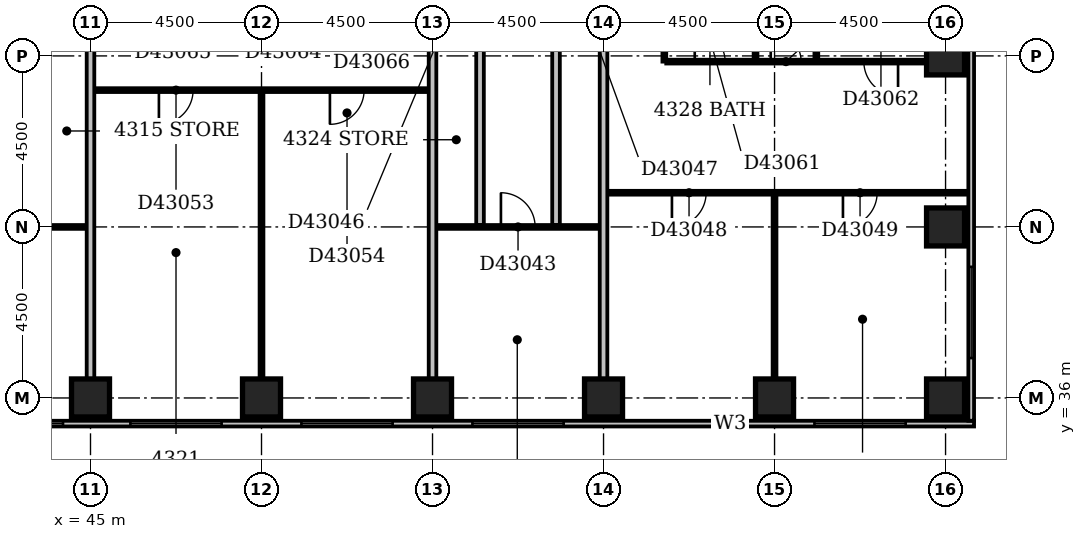
"""IFC4 building model, lengths in metres.
Left out: names, types, materials, properties, quantities, classifications, styles, units other than length and angle.
Written with IfcOpenShell. Run it as: python <this file> out.ifc"""

import sys

from ifc_helpers import new_model, si_unit, direction, frame, frame_2d, origin, origin_2d, place, context, subcontext, project, spatial, rectangle, extrude, element, fill, save


model = new_model("IFC4")
c1 = context("Model", 3, precision=1e-05, world=origin(), true_north=direction((0.0, 1.0)))
c2 = subcontext(c1, "Body", "Model", "MODEL_VIEW")
j1 = project(units=[si_unit("LENGTHUNIT", "METRE"), si_unit("PLANEANGLEUNIT", "RADIAN")], contexts=[c1])
p1 = place(None, origin())
s1 = spatial("IfcSite", under=j1, at=p1, CompositionType="ELEMENT")
p2 = place(p1, origin())
s2 = spatial("IfcBuilding", under=s1, at=p2, CompositionType="ELEMENT")
p3 = place(p2, frame((0.0, 0.0, 170.0)))
s3 = spatial("IfcBuildingStorey", under=s2, at=p3, CompositionType="ELEMENT", Elevation=170.0)
for number, where, z_axis, x_axis in (
    (1, (45.0, 36.0, -0.3), (0.0, 0.0, 1.0), (1.0, 0.0, 0.0)),
    (2, (49.5, 36.0, -0.3), (0.0, 0.0, 1.0), (1.0, 0.0, 0.0)),
    (3, (54.0, 36.0, -0.3), (0.0, 0.0, 1.0), (1.0, 0.0, 0.0)),
    (4, (58.5, 36.0, -0.3), (0.0, 0.0, 1.0), (1.0, 0.0, 0.0)),
    (5, (63.0, 36.0, -0.3), (0.0, 0.0, 1.0), (1.0, 0.0, 0.0)),
    (6, (67.5, 36.0, -0.3), (0.0, 0.0, 1.0), (1.0, 0.0, 0.0)),
    (7, (67.5, 40.5, -0.3), (0.0, 0.0, 1.0), (1.0, 0.0, 0.0)),
    (8, (67.5, 45.0, -0.3), (0.0, 0.0, 1.0), (1.0, 0.0, 0.0)),
):
    element("IfcColumn", number, at=place(p3, frame(where, z_axis=z_axis, x_axis=x_axis)), inside=s3, PredefinedType="COLUMN", context=c2, shape_type="SweptSolid", body=[
        extrude(rectangle(XDim=1.0, YDim=1.0, at=origin_2d()), origin(), (0.0, 0.0, 1.0), 3.45),
    ])
p4 = place(p3, frame((23.1, 35.325, 0.0), z_axis=(0.0, 0.0, 1.0), x_axis=(1.0, 0.0, 0.0)))
e9 = element("IfcWall", 9, at=p4, inside=s3, PredefinedType="STANDARD", context=c2, shape_type="SweptSolid", body=[
    extrude(rectangle(XDim=45.15, YDim=0.15, at=frame_2d((22.575, 0.0))), origin(), (0.0, 0.0, 1.0), 2.5),
])
p5 = place(p4, frame((0.45, 0.0, 0.6)))
e10 = element("IfcOpeningElement", 10, at=p5, cuts=e9, PredefinedType="OPENING", context=c2, shape_type="SweptSolid", body=[
    extrude(rectangle(XDim=2.4, YDim=1.8, at=frame_2d((1.2, 0.9))), frame((0.0, 0.087, 0.0), z_axis=(0.0, -1.0, 0.0), x_axis=(1.0, 0.0, 0.0)), (0.0, 0.0, 1.0), 0.174),
])
p6 = place(p4, frame((4.684, 0.0, 0.6)))
e11 = element("IfcOpeningElement", 11, at=p6, cuts=e9, PredefinedType="OPENING", context=c2, shape_type="SweptSolid", body=[
    extrude(rectangle(XDim=2.4, YDim=1.8, at=frame_2d((1.2, 0.9))), frame((0.0, 0.087, 0.0), z_axis=(0.0, -1.0, 0.0), x_axis=(1.0, 0.0, 0.0)), (0.0, 0.0, 1.0), 0.174),
])
p7 = place(p4, frame((9.45, 0.0, 0.6)))
e12 = element("IfcOpeningElement", 12, at=p7, cuts=e9, PredefinedType="OPENING", context=c2, shape_type="SweptSolid", body=[
    extrude(rectangle(XDim=2.4, YDim=1.8, at=frame_2d((1.2, 0.9))), frame((0.0, 0.087, 0.0), z_axis=(0.0, -1.0, 0.0), x_axis=(1.0, 0.0, 0.0)), (0.0, 0.0, 1.0), 0.174),
])
p8 = place(p4, frame((13.95, 0.0, 0.6)))
e13 = element("IfcOpeningElement", 13, at=p8, cuts=e9, PredefinedType="OPENING", context=c2, shape_type="SweptSolid", body=[
    extrude(rectangle(XDim=2.4, YDim=1.8, at=frame_2d((1.2, 0.9))), frame((0.0, 0.087, 0.0), z_axis=(0.0, -1.0, 0.0), x_axis=(1.0, 0.0, 0.0)), (0.0, 0.0, 1.0), 0.174),
])
p9 = place(p4, frame((19.076, 0.0, 0.6)))
e14 = element("IfcOpeningElement", 14, at=p9, cuts=e9, PredefinedType="OPENING", context=c2, shape_type="SweptSolid", body=[
    extrude(rectangle(XDim=2.1, YDim=1.8, at=frame_2d((1.05, 0.9))), frame((0.0, 0.087, 0.0), z_axis=(0.0, -1.0, 0.0), x_axis=(1.0, 0.0, 0.0)), (0.0, 0.0, 1.0), 0.174),
])
p10 = place(p4, frame((22.95, 0.0, 0.6)))
e15 = element("IfcOpeningElement", 15, at=p10, cuts=e9, PredefinedType="OPENING", context=c2, shape_type="SweptSolid", body=[
    extrude(rectangle(XDim=2.4, YDim=1.8, at=frame_2d((1.2, 0.9))), frame((0.0, 0.087, 0.0), z_axis=(0.0, -1.0, 0.0), x_axis=(1.0, 0.0, 0.0)), (0.0, 0.0, 1.0), 0.174),
])
p11 = place(p4, frame((27.45, 0.0, 0.6)))
e16 = element("IfcOpeningElement", 16, at=p11, cuts=e9, PredefinedType="OPENING", context=c2, shape_type="SweptSolid", body=[
    extrude(rectangle(XDim=2.4, YDim=1.8, at=frame_2d((1.2, 0.9))), frame((0.0, 0.087, 0.0), z_axis=(0.0, -1.0, 0.0), x_axis=(1.0, 0.0, 0.0)), (0.0, 0.0, 1.0), 0.174),
])
p12 = place(p4, frame((31.95, 0.0, 0.6)))
e17 = element("IfcOpeningElement", 17, at=p12, cuts=e9, PredefinedType="OPENING", context=c2, shape_type="SweptSolid", body=[
    extrude(rectangle(XDim=2.4, YDim=1.8, at=frame_2d((1.2, 0.9))), frame((0.0, 0.087, 0.0), z_axis=(0.0, -1.0, 0.0), x_axis=(1.0, 0.0, 0.0)), (0.0, 0.0, 1.0), 0.174),
])
p13 = place(p4, frame((38.285, 0.0, 0.6)))
e18 = element("IfcOpeningElement", 18, at=p13, cuts=e9, PredefinedType="OPENING", context=c2, shape_type="SweptSolid", body=[
    extrude(rectangle(XDim=0.9, YDim=1.8, at=frame_2d((0.45, 0.9))), frame((0.0, 0.087, 0.0), z_axis=(0.0, -1.0, 0.0), x_axis=(1.0, 0.0, 0.0)), (0.0, 0.0, 1.0), 0.174),
])
p14 = place(p4, frame((40.95, 0.0, 0.6)))
e19 = element("IfcOpeningElement", 19, at=p14, cuts=e9, PredefinedType="OPENING", context=c2, shape_type="SweptSolid", body=[
    extrude(rectangle(XDim=2.4, YDim=1.8, at=frame_2d((1.2, 0.9))), frame((0.0, 0.087, 0.0), z_axis=(0.0, -1.0, 0.0), x_axis=(1.0, 0.0, 0.0)), (0.0, 0.0, 1.0), 0.174),
])
p15 = place(p3, frame((68.175, 35.4, 0.0), z_axis=(0.0, 0.0, 1.0), x_axis=(0.0, 1.0, 0.0)))
e20 = element("IfcWall", 20, at=p15, inside=s3, PredefinedType="STANDARD", context=c2, shape_type="SweptSolid", body=[
    extrude(rectangle(XDim=23.85, YDim=0.15, at=frame_2d((11.925, 0.0))), origin(), (0.0, 0.0, 1.0), 2.5),
])
p16 = place(p15, frame((1.65, 0.0, 0.6)))
e21 = element("IfcOpeningElement", 21, at=p16, cuts=e20, PredefinedType="OPENING", context=c2, shape_type="SweptSolid", body=[
    extrude(rectangle(XDim=2.4, YDim=1.8, at=frame_2d((1.2, 0.9))), frame((0.0, 0.087, 0.0), z_axis=(0.0, -1.0, 0.0), x_axis=(1.0, 0.0, 0.0)), (0.0, 0.0, 1.0), 0.174),
])
p17 = place(p15, frame((10.65, 0.0, 0.6)))
e22 = element("IfcOpeningElement", 22, at=p17, cuts=e20, PredefinedType="OPENING", context=c2, shape_type="SweptSolid", body=[
    extrude(rectangle(XDim=2.4, YDim=1.8, at=frame_2d((1.2, 0.9))), frame((0.0, 0.087, 0.0), z_axis=(0.0, -1.0, 0.0), x_axis=(1.0, 0.0, 0.0)), (0.0, 0.0, 1.0), 0.174),
])
p18 = place(p15, frame((19.65, 0.0, 0.6)))
e23 = element("IfcOpeningElement", 23, at=p18, cuts=e20, PredefinedType="OPENING", context=c2, shape_type="SweptSolid", body=[
    extrude(rectangle(XDim=2.4, YDim=1.8, at=frame_2d((1.2, 0.9))), frame((0.0, 0.087, 0.0), z_axis=(0.0, -1.0, 0.0), x_axis=(1.0, 0.0, 0.0)), (0.0, 0.0, 1.0), 0.174),
])
p19 = place(p3, frame((45.0, 36.5, 0.0), z_axis=(0.0, 0.0, 1.0), x_axis=(0.0, 1.0, 0.0)))
e24 = element("IfcWall", 24, at=p19, inside=s3, PredefinedType="PARTITIONING", context=c2, shape_type="SweptSolid", body=[
    extrude(rectangle(XDim=12.9, YDim=0.2, at=frame_2d((6.45, 0.0))), origin(), (0.0, 0.0, 1.0), 2.45),
])
p20 = place(p3, frame((49.5, 36.5, 0.0), z_axis=(0.0, 0.0, 1.0), x_axis=(0.0, 1.0, 0.0)))
e25 = element("IfcWall", 25, at=p20, inside=s3, PredefinedType="PARTITIONING", context=c2, shape_type="SweptSolid", body=[
    extrude(rectangle(XDim=7.55, YDim=0.1, at=frame_2d((3.775, 0.0))), origin(), (0.0, 0.0, 1.0), 3.15),
])
p21 = place(p3, frame((54.0, 36.5, 0.0), z_axis=(0.0, 0.0, 1.0), x_axis=(0.0, 1.0, 0.0)))
e26 = element("IfcWall", 26, at=p21, inside=s3, PredefinedType="PARTITIONING", context=c2, shape_type="SweptSolid", body=[
    extrude(rectangle(XDim=12.9, YDim=0.2, at=frame_2d((6.45, 0.0))), origin(), (0.0, 0.0, 1.0), 2.45),
])
p22 = place(p3, frame((58.5, 36.5, 0.0), z_axis=(0.0, 0.0, 1.0), x_axis=(0.0, 1.0, 0.0)))
e27 = element("IfcWall", 27, at=p22, inside=s3, PredefinedType="PARTITIONING", context=c2, shape_type="SweptSolid", body=[
    extrude(rectangle(XDim=12.9, YDim=0.2, at=frame_2d((6.45, 0.0))), origin(), (0.0, 0.0, 1.0), 3.15),
])
p23 = place(p3, frame((63.0, 36.5, 0.0), z_axis=(0.0, 0.0, 1.0), x_axis=(0.0, 1.0, 0.0)))
e28 = element("IfcWall", 28, at=p23, inside=s3, PredefinedType="PARTITIONING", context=c2, shape_type="SweptSolid", body=[
    extrude(rectangle(XDim=4.85, YDim=0.1, at=frame_2d((2.425, 0.0))), origin(), (0.0, 0.0, 1.0), 2.25),
])
p24 = place(p3, frame((40.6, 40.5, 0.0), z_axis=(0.0, 0.0, 1.0), x_axis=(1.0, 0.0, 0.0)))
e29 = element("IfcWall", 29, at=p24, inside=s3, PredefinedType="PARTITIONING", context=c2, shape_type="SweptSolid", body=[
    extrude(rectangle(XDim=4.3, YDim=0.1, at=frame_2d((2.15, 0.0))), origin(), (0.0, 0.0, 1.0), 3.15),
])
p25 = place(p24, frame((1.7, 0.0, 0.0)))
e30 = element("IfcOpeningElement", 30, at=p25, cuts=e29, PredefinedType="OPENING", context=c2, shape_type="SweptSolid", body=[
    extrude(rectangle(XDim=0.9, YDim=2.1, at=frame_2d((0.45, 1.05))), frame((0.0, 0.062, 0.0), z_axis=(0.0, -1.0, 0.0), x_axis=(1.0, 0.0, 0.0)), (0.0, 0.0, 1.0), 0.124),
])
p26 = place(p3, frame((54.1, 40.5, 0.0), z_axis=(0.0, 0.0, 1.0), x_axis=(1.0, 0.0, 0.0)))
e31 = element("IfcWall", 31, at=p26, inside=s3, PredefinedType="PARTITIONING", context=c2, shape_type="SweptSolid", body=[
    extrude(rectangle(XDim=4.3, YDim=0.1, at=frame_2d((2.15, 0.0))), origin(), (0.0, 0.0, 1.0), 3.15),
])
p27 = place(p26, frame((1.7, 0.0, 0.0)))
e32 = element("IfcOpeningElement", 32, at=p27, cuts=e31, PredefinedType="OPENING", context=c2, shape_type="SweptSolid", body=[
    extrude(rectangle(XDim=0.9, YDim=2.1, at=frame_2d((0.45, 1.05))), frame((0.0, 0.062, 0.0), z_axis=(0.0, -1.0, 0.0), x_axis=(1.0, 0.0, 0.0)), (0.0, 0.0, 1.0), 0.124),
])
p28 = place(p3, frame((55.25, 40.55, 0.0), z_axis=(0.0, 0.0, 1.0), x_axis=(0.0, 1.0, 0.0)))
e33 = element("IfcWall", 33, at=p28, inside=s3, PredefinedType="PARTITIONING", context=c2, shape_type="SweptSolid", body=[
    extrude(rectangle(XDim=8.95, YDim=0.2, at=frame_2d((4.475, 0.0))), origin(), (0.0, 0.0, 1.0), 3.15),
])
p29 = place(p28, frame((5.55, 0.0, 0.0)))
e34 = element("IfcOpeningElement", 34, at=p29, cuts=e33, PredefinedType="OPENING", context=c2, shape_type="SweptSolid", body=[
    extrude(rectangle(XDim=0.8, YDim=2.1, at=frame_2d((0.4, 1.05))), frame((0.0, 0.112, 0.0), z_axis=(0.0, -1.0, 0.0), x_axis=(1.0, 0.0, 0.0)), (0.0, 0.0, 1.0), 0.224),
])
p30 = place(p3, frame((57.25, 40.55, 0.0), z_axis=(0.0, 0.0, 1.0), x_axis=(0.0, 1.0, 0.0)))
e35 = element("IfcWall", 35, at=p30, inside=s3, PredefinedType="PARTITIONING", context=c2, shape_type="SweptSolid", body=[
    extrude(rectangle(XDim=8.95, YDim=0.2, at=frame_2d((4.475, 0.0))), origin(), (0.0, 0.0, 1.0), 3.15),
])
p31 = place(p30, frame((5.55, 0.0, 0.0)))
e36 = element("IfcOpeningElement", 36, at=p31, cuts=e35, PredefinedType="OPENING", context=c2, shape_type="SweptSolid", body=[
    extrude(rectangle(XDim=0.8, YDim=2.1, at=frame_2d((0.4, 1.05))), frame((0.0, 0.112, 0.0), z_axis=(0.0, -1.0, 0.0), x_axis=(1.0, 0.0, 0.0)), (0.0, 0.0, 1.0), 0.224),
])
p32 = place(p3, frame((58.6, 41.4, 0.0), z_axis=(0.0, 0.0, 1.0), x_axis=(1.0, 0.0, 0.0)))
e37 = element("IfcWall", 37, at=p32, inside=s3, PredefinedType="PARTITIONING", context=c2, shape_type="SweptSolid", body=[
    extrude(rectangle(XDim=9.5, YDim=0.1, at=frame_2d((4.75, 0.0))), origin(), (0.0, 0.0, 1.0), 3.15),
])
p33 = place(p32, frame((1.7, 0.0, 0.0)))
e38 = element("IfcOpeningElement", 38, at=p33, cuts=e37, PredefinedType="OPENING", context=c2, shape_type="SweptSolid", body=[
    extrude(rectangle(XDim=0.9, YDim=2.1, at=frame_2d((0.45, 1.05))), frame((0.0, 0.062, 0.0), z_axis=(0.0, -1.0, 0.0), x_axis=(1.0, 0.0, 0.0)), (0.0, 0.0, 1.0), 0.124),
])
p34 = place(p32, frame((6.2, 0.0, 0.0)))
e39 = element("IfcOpeningElement", 39, at=p34, cuts=e37, PredefinedType="OPENING", context=c2, shape_type="SweptSolid", body=[
    extrude(rectangle(XDim=0.9, YDim=2.1, at=frame_2d((0.45, 1.05))), frame((0.0, 0.062, 0.0), z_axis=(0.0, -1.0, 0.0), x_axis=(1.0, 0.0, 0.0)), (0.0, 0.0, 1.0), 0.124),
])
p35 = place(p3, frame((45.1, 44.1, 0.0), z_axis=(0.0, 0.0, 1.0), x_axis=(1.0, 0.0, 0.0)))
e40 = element("IfcWall", 40, at=p35, inside=s3, PredefinedType="PARTITIONING", context=c2, shape_type="SweptSolid", body=[
    extrude(rectangle(XDim=8.8, YDim=0.1, at=frame_2d((4.4, 0.0))), origin(), (0.0, 0.0, 1.0), 3.15),
])
p36 = place(p35, frame((1.7, 0.0, 0.0)))
e41 = element("IfcOpeningElement", 41, at=p36, cuts=e40, PredefinedType="OPENING", context=c2, shape_type="SweptSolid", body=[
    extrude(rectangle(XDim=0.9, YDim=2.1, at=frame_2d((0.45, 1.05))), frame((0.0, 0.062, 0.0), z_axis=(0.0, -1.0, 0.0), x_axis=(1.0, 0.0, 0.0)), (0.0, 0.0, 1.0), 0.124),
])
p37 = place(p35, frame((6.2, 0.0, 0.0)))
e42 = element("IfcOpeningElement", 42, at=p37, cuts=e40, PredefinedType="OPENING", context=c2, shape_type="SweptSolid", body=[
    extrude(rectangle(XDim=0.9, YDim=2.1, at=frame_2d((0.45, 1.05))), frame((0.0, 0.062, 0.0), z_axis=(0.0, -1.0, 0.0), x_axis=(1.0, 0.0, 0.0)), (0.0, 0.0, 1.0), 0.124),
])
p38 = place(p3, frame((60.1, 44.85, 0.0), z_axis=(0.0, 0.0, 1.0), x_axis=(0.0, 1.0, 0.0)))
e43 = element("IfcWall", 43, at=p38, inside=s3, PredefinedType="PLUMBINGWALL", context=c2, shape_type="SweptSolid", body=[
    extrude(rectangle(XDim=4.55, YDim=0.1, at=frame_2d((2.275, 0.0))), origin(), (0.0, 0.0, 1.0), 3.15),
])
p39 = place(p3, frame((60.15, 44.85, 0.0), z_axis=(0.0, 0.0, 1.0), x_axis=(1.0, 0.0, 0.0)))
e44 = element("IfcWall", 44, at=p39, inside=s3, PredefinedType="PARTITIONING", context=c2, shape_type="SweptSolid", body=[
    extrude(rectangle(XDim=6.85, YDim=0.1, at=frame_2d((3.425, 0.0))), origin(), (0.0, 0.0, 1.0), 3.15),
])
p40 = place(p39, frame((0.75, 0.0, 0.0)))
e45 = element("IfcOpeningElement", 45, at=p40, cuts=e44, PredefinedType="OPENING", context=c2, shape_type="SweptSolid", body=[
    extrude(rectangle(XDim=0.8, YDim=2.1, at=frame_2d((0.4, 1.05))), frame((0.0, 0.062, 0.0), z_axis=(0.0, -1.0, 0.0), x_axis=(1.0, 0.0, 0.0)), (0.0, 0.0, 1.0), 0.124),
])
p41 = place(p39, frame((5.2, 0.0, 0.0)))
e46 = element("IfcOpeningElement", 46, at=p41, cuts=e44, PredefinedType="OPENING", context=c2, shape_type="SweptSolid", body=[
    extrude(rectangle(XDim=0.9, YDim=2.1, at=frame_2d((0.45, 1.05))), frame((0.0, 0.062, 0.0), z_axis=(0.0, -1.0, 0.0), x_axis=(1.0, 0.0, 0.0)), (0.0, 0.0, 1.0), 0.124),
])
p42 = place(p39, frame((2.75, 0.0, 0.0)))
e47 = element("IfcOpeningElement", 47, at=p42, cuts=e44, PredefinedType="OPENING", context=c2, shape_type="SweptSolid", body=[
    extrude(rectangle(XDim=0.8, YDim=2.1, at=frame_2d((0.4, 1.05))), frame((0.0, 0.062, 0.0), z_axis=(0.0, -1.0, 0.0), x_axis=(1.0, 0.0, 0.0)), (0.0, 0.0, 1.0), 0.124),
])
p43 = place(p3, frame((62.5, 44.9, 0.0), z_axis=(0.0, 0.0, 1.0), x_axis=(0.0, 1.0, 0.0)))
e48 = element("IfcWall", 48, at=p43, inside=s3, PredefinedType="PLUMBINGWALL", context=c2, shape_type="SweptSolid", body=[
    extrude(rectangle(XDim=4.5, YDim=0.1, at=frame_2d((2.25, 0.0))), origin(), (0.0, 0.0, 1.0), 2.25),
])
p44 = place(p3, frame((64.1, 44.9, 0.0), z_axis=(0.0, 0.0, 1.0), x_axis=(0.0, 1.0, 0.0)))
e49 = element("IfcWall", 49, at=p44, inside=s3, PredefinedType="PARTITIONING", context=c2, shape_type="SweptSolid", body=[
    extrude(rectangle(XDim=4.5, YDim=0.1, at=frame_2d((2.25, 0.0))), origin(), (0.0, 0.0, 1.0), 3.15),
])
p45 = place(p9, origin())
e50 = element("IfcWindow", 50, at=p45, inside=s3, PartitioningType="SINGLE_PANEL", PredefinedType="WINDOW", context=c2, shape_type="SweptSolid", body=[
    extrude(rectangle(XDim=2.1, YDim=1.8, at=frame_2d((1.05, 0.9))), frame((0.0, 0.03, 0.0), z_axis=(0.0, -1.0, 0.0), x_axis=(1.0, 0.0, 0.0)), (0.0, 0.0, 1.0), 0.06),
])
fill(e14, e50)
p46 = place(p10, origin())
e51 = element("IfcWindow", 51, at=p46, inside=s3, PartitioningType="SINGLE_PANEL", PredefinedType="WINDOW", context=c2, shape_type="SweptSolid", body=[
    extrude(rectangle(XDim=2.4, YDim=1.8, at=frame_2d((1.2, 0.9))), frame((0.0, 0.03, 0.0), z_axis=(0.0, -1.0, 0.0), x_axis=(1.0, 0.0, 0.0)), (0.0, 0.0, 1.0), 0.06),
])
fill(e15, e51)
p47 = place(p11, origin())
e52 = element("IfcWindow", 52, at=p47, inside=s3, PartitioningType="SINGLE_PANEL", PredefinedType="WINDOW", context=c2, shape_type="SweptSolid", body=[
    extrude(rectangle(XDim=2.4, YDim=1.8, at=frame_2d((1.2, 0.9))), frame((0.0, 0.03, 0.0), z_axis=(0.0, -1.0, 0.0), x_axis=(1.0, 0.0, 0.0)), (0.0, 0.0, 1.0), 0.06),
])
fill(e16, e52)
p48 = place(p12, origin())
e53 = element("IfcWindow", 53, at=p48, inside=s3, PartitioningType="SINGLE_PANEL", PredefinedType="WINDOW", context=c2, shape_type="SweptSolid", body=[
    extrude(rectangle(XDim=2.4, YDim=1.8, at=frame_2d((1.2, 0.9))), frame((0.0, 0.03, 0.0), z_axis=(0.0, -1.0, 0.0), x_axis=(1.0, 0.0, 0.0)), (0.0, 0.0, 1.0), 0.06),
])
fill(e17, e53)
p49 = place(p13, origin())
e54 = element("IfcWindow", 54, at=p49, inside=s3, PartitioningType="SINGLE_PANEL", PredefinedType="WINDOW", context=c2, shape_type="SweptSolid", body=[
    extrude(rectangle(XDim=0.9, YDim=1.8, at=frame_2d((0.45, 0.9))), frame((0.0, 0.03, 0.0), z_axis=(0.0, -1.0, 0.0), x_axis=(1.0, 0.0, 0.0)), (0.0, 0.0, 1.0), 0.06),
])
fill(e18, e54)
p50 = place(p14, origin())
e55 = element("IfcWindow", 55, at=p50, inside=s3, PartitioningType="SINGLE_PANEL", PredefinedType="WINDOW", context=c2, shape_type="SweptSolid", body=[
    extrude(rectangle(XDim=2.4, YDim=1.8, at=frame_2d((1.2, 0.9))), frame((0.0, 0.03, 0.0), z_axis=(0.0, -1.0, 0.0), x_axis=(1.0, 0.0, 0.0)), (0.0, 0.0, 1.0), 0.06),
])
fill(e19, e55)
p51 = place(p16, origin())
e56 = element("IfcWindow", 56, at=p51, inside=s3, PartitioningType="SINGLE_PANEL", PredefinedType="WINDOW", context=c2, shape_type="SweptSolid", body=[
    extrude(rectangle(XDim=2.4, YDim=1.8, at=frame_2d((1.2, 0.9))), frame((0.0, 0.03, 0.0), z_axis=(0.0, -1.0, 0.0), x_axis=(1.0, 0.0, 0.0)), (0.0, 0.0, 1.0), 0.06),
])
fill(e21, e56)
p52 = place(p27, origin())
e57 = element("IfcDoor", 57, at=p52, inside=s3, OperationType="SINGLE_SWING_LEFT", PredefinedType="DOOR", context=c2, shape_type="SweptSolid", body=[
    extrude(rectangle(XDim=0.9, YDim=2.1, at=frame_2d((0.45, 1.05))), frame((0.0, 0.025, 0.0), z_axis=(0.0, -1.0, 0.0), x_axis=(1.0, 0.0, 0.0)), (0.0, 0.0, 1.0), 0.05),
])
fill(e32, e57)
p53 = place(p33, frame((0.9, 0.0, 0.0), z_axis=(0.0, 0.0, 1.0), x_axis=(-1.0, 0.0, 0.0)))
e58 = element("IfcDoor", 58, at=p53, inside=s3, OperationType="SINGLE_SWING_RIGHT", PredefinedType="DOOR", context=c2, shape_type="SweptSolid", body=[
    extrude(rectangle(XDim=0.9, YDim=2.1, at=frame_2d((0.45, 1.05))), frame((0.0, 0.025, 0.0), z_axis=(0.0, -1.0, 0.0), x_axis=(1.0, 0.0, 0.0)), (0.0, 0.0, 1.0), 0.05),
])
fill(e38, e58)
p54 = place(p34, frame((0.9, 0.0, 0.0), z_axis=(0.0, 0.0, 1.0), x_axis=(-1.0, 0.0, 0.0)))
e59 = element("IfcDoor", 59, at=p54, inside=s3, OperationType="SINGLE_SWING_RIGHT", PredefinedType="DOOR", context=c2, shape_type="SweptSolid", body=[
    extrude(rectangle(XDim=0.9, YDim=2.1, at=frame_2d((0.45, 1.05))), frame((0.0, 0.025, 0.0), z_axis=(0.0, -1.0, 0.0), x_axis=(1.0, 0.0, 0.0)), (0.0, 0.0, 1.0), 0.05),
])
fill(e39, e59)
p55 = place(p36, frame((0.9, 0.0, 0.0), z_axis=(0.0, 0.0, 1.0), x_axis=(-1.0, 0.0, 0.0)))
e60 = element("IfcDoor", 60, at=p55, inside=s3, OperationType="SINGLE_SWING_RIGHT", PredefinedType="DOOR", context=c2, shape_type="SweptSolid", body=[
    extrude(rectangle(XDim=0.9, YDim=2.1, at=frame_2d((0.45, 1.05))), frame((0.0, 0.025, 0.0), z_axis=(0.0, -1.0, 0.0), x_axis=(1.0, 0.0, 0.0)), (0.0, 0.0, 1.0), 0.05),
])
fill(e41, e60)
p56 = place(p37, frame((0.9, 0.0, 0.0), z_axis=(0.0, 0.0, 1.0), x_axis=(-1.0, 0.0, 0.0)))
e61 = element("IfcDoor", 61, at=p56, inside=s3, OperationType="SINGLE_SWING_RIGHT", PredefinedType="DOOR", context=c2, shape_type="SweptSolid", body=[
    extrude(rectangle(XDim=0.9, YDim=2.1, at=frame_2d((0.45, 1.05))), frame((0.0, 0.025, 0.0), z_axis=(0.0, -1.0, 0.0), x_axis=(1.0, 0.0, 0.0)), (0.0, 0.0, 1.0), 0.05),
])
fill(e42, e61)
p57 = place(p40, origin())
e62 = element("IfcDoor", 62, at=p57, inside=s3, OperationType="SINGLE_SWING_LEFT", PredefinedType="DOOR", context=c2, shape_type="SweptSolid", body=[
    extrude(rectangle(XDim=0.8, YDim=2.1, at=frame_2d((0.4, 1.05))), frame((0.0, 0.025, 0.0), z_axis=(0.0, -1.0, 0.0), x_axis=(1.0, 0.0, 0.0)), (0.0, 0.0, 1.0), 0.05),
])
fill(e45, e62)
p58 = place(p41, origin())
e63 = element("IfcDoor", 63, at=p58, inside=s3, OperationType="SINGLE_SWING_RIGHT", PredefinedType="DOOR", context=c2, shape_type="SweptSolid", body=[
    extrude(rectangle(XDim=0.9, YDim=2.1, at=frame_2d((0.45, 1.05))), frame((0.0, 0.025, 0.0), z_axis=(0.0, -1.0, 0.0), x_axis=(1.0, 0.0, 0.0)), (0.0, 0.0, 1.0), 0.05),
])
fill(e46, e63)
p59 = place(p42, origin())
e64 = element("IfcDoor", 64, at=p59, inside=s3, OperationType="SINGLE_SWING_LEFT", PredefinedType="DOOR", context=c2, shape_type="SweptSolid", body=[
    extrude(rectangle(XDim=0.8, YDim=2.1, at=frame_2d((0.4, 1.05))), frame((0.0, 0.025, 0.0), z_axis=(0.0, -1.0, 0.0), x_axis=(1.0, 0.0, 0.0)), (0.0, 0.0, 1.0), 0.05),
])
fill(e47, e64)
save(model, sys.argv[1])
